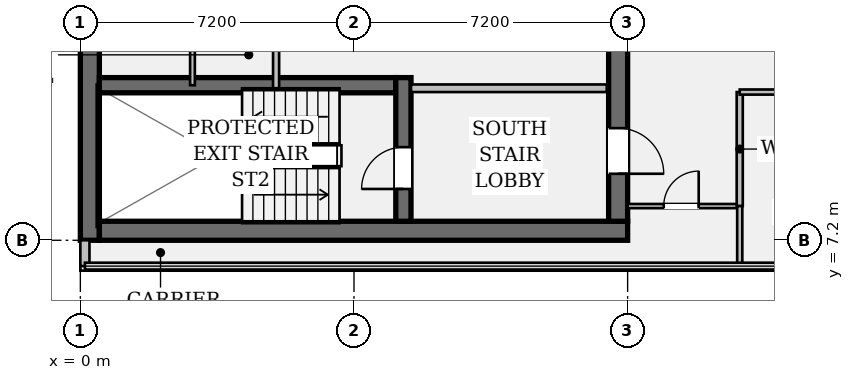
"""IFC4 building model, lengths in metres.
Left out: names, types, materials, properties, quantities, classifications, styles, units other than length and angle.
Written with IfcOpenShell. Run it as: python <this file> out.ifc"""

import sys

from ifc_helpers import new_model, si_unit, direction, frame, frame_2d, origin, place, context, subcontext, project, spatial, rectangle, extrude, element, fill, save


model = new_model("IFC4")
c1 = context("Model", 3, precision=1e-05, world=origin(), true_north=direction((0.0, 1.0)))
c2 = subcontext(c1, "Body", "Model", "MODEL_VIEW")
j1 = project(units=[si_unit("LENGTHUNIT", "METRE"), si_unit("PLANEANGLEUNIT", "RADIAN")], contexts=[c1])
p1 = place(None, origin())
s1 = spatial("IfcSite", under=j1, at=p1, CompositionType="ELEMENT")
p2 = place(p1, origin())
s2 = spatial("IfcBuilding", under=s1, at=p2, CompositionType="ELEMENT")
p3 = place(p2, frame((0.0, 0.0, 272.65)))
s3 = spatial("IfcBuildingStorey", under=s2, at=p3, CompositionType="ELEMENT", Elevation=272.65)
p4 = place(p3, frame((0.25, 7.2, 0.0), z_axis=(0.0, 0.0, 1.0), x_axis=(0.0, 1.0, 0.0)))
e1 = element("IfcWall", 1, at=p4, inside=s3, PredefinedType="SHEAR", context=c2, shape_type="SweptSolid", body=[
    extrude(rectangle(XDim=28.8, YDim=0.5, at=frame_2d((14.4, 0.0))), origin(), (0.0, 0.0, 1.0), 3.24),
])
p5 = place(p3, frame((0.5, 7.45, 0.0), z_axis=(0.0, 0.0, 1.0), x_axis=(1.0, 0.0, 0.0)))
e2 = element("IfcWall", 2, at=p5, inside=s3, PredefinedType="SHEAR", context=c2, shape_type="SweptSolid", body=[
    extrude(rectangle(XDim=13.9, YDim=0.5, at=frame_2d((6.95, 0.0))), origin(), (0.0, 0.0, 1.0), 3.24),
])
p6 = place(p3, frame((14.15, 35.5, 0.0), z_axis=(0.0, 0.0, 1.0), x_axis=(0.0, -1.0, 0.0)))
e3 = element("IfcWall", 3, at=p6, inside=s3, PredefinedType="SHEAR", context=c2, shape_type="SweptSolid", body=[
    extrude(rectangle(XDim=27.8, YDim=0.5, at=frame_2d((13.9, 0.0))), origin(), (0.0, 0.0, 1.0), 3.24),
])
p7 = place(p6, frame((1.4, 0.0, 0.0)))
e4 = element("IfcOpeningElement", 4, at=p7, cuts=e3, PredefinedType="OPENING", context=c2, shape_type="SweptSolid", body=[
    extrude(rectangle(XDim=1.2, YDim=2.15, at=frame_2d((0.6, 1.075))), frame((0.0, 0.262, 0.0), z_axis=(0.0, -1.0, 0.0), x_axis=(1.0, 0.0, 0.0)), (0.0, 0.0, 1.0), 0.524),
])
p8 = place(p6, frame((25.35, 0.0, 0.0)))
e5 = element("IfcOpeningElement", 5, at=p8, cuts=e3, PredefinedType="OPENING", context=c2, shape_type="SweptSolid", body=[
    extrude(rectangle(XDim=1.2, YDim=2.15, at=frame_2d((0.6, 1.075))), frame((0.0, 0.262, 0.0), z_axis=(0.0, -1.0, 0.0), x_axis=(1.0, 0.0, 0.0)), (0.0, 0.0, 1.0), 0.524),
])
p9 = place(p6, frame((14.7, 0.0, 0.0)))
e6 = element("IfcOpeningElement", 6, at=p9, cuts=e3, PredefinedType="OPENING", context=c2, shape_type="SweptSolid", body=[
    extrude(rectangle(XDim=1.6, YDim=2.2, at=frame_2d((0.8, 1.1))), frame((0.0, 0.262, 0.0), z_axis=(0.0, -1.0, 0.0), x_axis=(1.0, 0.0, 0.0)), (0.0, 0.0, 1.0), 0.524),
])
p10 = place(p3, frame((0.5, 11.28, 0.0), z_axis=(0.0, 0.0, 1.0), x_axis=(1.0, 0.0, 0.0)))
e7 = element("IfcWall", 7, at=p10, inside=s3, PredefinedType="SHEAR", context=c2, shape_type="SweptSolid", body=[
    extrude(rectangle(XDim=7.8, YDim=0.4, at=frame_2d((3.9, 0.0))), origin(), (0.0, 0.0, 1.0), 3.24),
])
p11 = place(p3, frame((8.5, 7.7, 0.0), z_axis=(0.0, 0.0, 1.0), x_axis=(0.0, 1.0, 0.0)))
e8 = element("IfcWall", 8, at=p11, inside=s3, PredefinedType="SHEAR", context=c2, shape_type="SweptSolid", body=[
    extrude(rectangle(XDim=3.78, YDim=0.4, at=frame_2d((1.89, 0.0))), origin(), (0.0, 0.0, 1.0), 3.24),
])
p12 = place(p11, frame((0.85, 0.0, 0.0)))
e9 = element("IfcOpeningElement", 9, at=p12, cuts=e8, PredefinedType="OPENING", context=c2, shape_type="SweptSolid", body=[
    extrude(rectangle(XDim=1.1, YDim=2.15, at=frame_2d((0.55, 1.075))), frame((0.0, 0.212, 0.0), z_axis=(0.0, -1.0, 0.0), x_axis=(1.0, 0.0, 0.0)), (0.0, 0.0, 1.0), 0.424),
])
p13 = place(p3, frame((0.12, 6.52, 0.0), z_axis=(0.0, 0.0, 1.0), x_axis=(0.0, 1.0, 0.0)))
e10 = element("IfcWall", 10, at=p13, inside=s3, PredefinedType="STANDARD", context=c2, shape_type="SweptSolid", body=[
    extrude(rectangle(XDim=0.68, YDim=0.24, at=frame_2d((0.34, 0.0))), origin(), (0.0, 0.0, 1.0), 3.24),
])
p14 = place(p3, frame((8.7, 11.2, 0.0), z_axis=(0.0, 0.0, 1.0), x_axis=(1.0, 0.0, 0.0)))
e11 = element("IfcWall", 11, at=p14, inside=s3, PredefinedType="PARTITIONING", context=c2, shape_type="SweptSolid", body=[
    extrude(rectangle(XDim=5.15, YDim=0.2, at=frame_2d((2.575, 0.0))), origin(), (0.0, 0.0, 1.0), 3.24),
])
p15 = place(p3, frame((5.15, 11.2, 0.0), z_axis=(0.0, 0.0, 1.0), x_axis=(0.0, 1.0, 0.0)))
e12 = element("IfcWall", 12, at=p15, inside=s3, PredefinedType="PARTITIONING", context=c2, shape_type="SweptSolid", body=[
    extrude(rectangle(XDim=6.6, YDim=0.16, at=frame_2d((3.3, 0.0))), origin(), (0.0, 0.0, 1.0), 3.24),
])
p16 = place(p3, frame((2.95, 11.28, 0.0), z_axis=(0.0, 0.0, 1.0), x_axis=(0.0, 1.0, 0.0)))
e13 = element("IfcWall", 13, at=p16, inside=s3, PredefinedType="PARTITIONING", context=c2, shape_type="SweptSolid", body=[
    extrude(rectangle(XDim=4.42, YDim=0.125, at=frame_2d((2.21, 0.0))), origin(), (0.0, 0.0, 1.0), 3.24),
])
p17 = place(p16, frame((1.6, 0.0, 0.0)))
e14 = element("IfcOpeningElement", 14, at=p17, cuts=e13, PredefinedType="OPENING", context=c2, shape_type="SweptSolid", body=[
    extrude(rectangle(XDim=0.85, YDim=2.15, at=frame_2d((0.425, 1.075))), frame((0.0, 0.074, 0.0), z_axis=(0.0, -1.0, 0.0), x_axis=(1.0, 0.0, 0.0)), (0.0, 0.0, 1.0), 0.149),
])
p18 = place(p3, frame((14.4, 8.1, 0.0), z_axis=(0.0, 0.0, 1.0), x_axis=(1.0, 0.0, 0.0)))
e15 = element("IfcWall", 15, at=p18, inside=s3, PredefinedType="PARTITIONING", context=c2, shape_type="SweptSolid", body=[
    extrude(rectangle(XDim=2.95, YDim=0.11, at=frame_2d((1.475, 0.0))), origin(), (0.0, 0.0, 1.0), 3.24),
])
p19 = place(p18, frame((0.95, 0.0, 0.0)))
e16 = element("IfcOpeningElement", 16, at=p19, cuts=e15, PredefinedType="OPENING", context=c2, shape_type="SweptSolid", body=[
    extrude(rectangle(XDim=0.92, YDim=2.15, at=frame_2d((0.46, 1.075))), frame((0.0, 0.067, 0.0), z_axis=(0.0, -1.0, 0.0), x_axis=(1.0, 0.0, 0.0)), (0.0, 0.0, 1.0), 0.134),
])
p20 = place(p3, frame((17.35, 8.1, 0.0), z_axis=(0.0, 0.0, 1.0), x_axis=(0.0, 1.0, 0.0)))
e17 = element("IfcWall", 17, at=p20, inside=s3, PredefinedType="PARTITIONING", context=c2, shape_type="SweptSolid", body=[
    extrude(rectangle(XDim=3.0, YDim=0.16, at=frame_2d((1.5, 0.0))), origin(), (0.0, 0.0, 1.0), 3.24),
])
p21 = place(p3, frame((17.35, 11.1, 0.0), z_axis=(0.0, 0.0, 1.0), x_axis=(1.0, 0.0, 0.0)))
e18 = element("IfcWall", 18, at=p21, inside=s3, PredefinedType="PARTITIONING", context=c2, shape_type="SweptSolid", body=[
    extrude(rectangle(XDim=11.4, YDim=0.135, at=frame_2d((5.7, 0.0))), origin(), (0.0, 0.0, 1.0), 2.676),
])
p22 = place(p21, frame((3.73, 0.0, 0.0)))
e19 = element("IfcOpeningElement", 19, at=p22, cuts=e18, PredefinedType="OPENING", context=c2, shape_type="SweptSolid", body=[
    extrude(rectangle(XDim=0.92, YDim=2.15, at=frame_2d((0.46, 1.075))), frame((0.0, 0.08, 0.0), z_axis=(0.0, -1.0, 0.0), x_axis=(1.0, 0.0, 0.0)), (0.0, 0.0, 1.0), 0.159),
])
p23 = place(p21, frame((9.42, 0.0, 0.0)))
e20 = element("IfcOpeningElement", 20, at=p23, cuts=e18, PredefinedType="OPENING", context=c2, shape_type="SweptSolid", body=[
    extrude(rectangle(XDim=0.92, YDim=2.15, at=frame_2d((0.46, 1.075))), frame((0.0, 0.08, 0.0), z_axis=(0.0, -1.0, 0.0), x_axis=(1.0, 0.0, 0.0)), (0.0, 0.0, 1.0), 0.159),
])
p24 = place(p3, frame((17.35, 6.52, 0.0), z_axis=(0.0, 0.0, 1.0), x_axis=(0.0, 1.0, 0.0)))
e21 = element("IfcWall", 21, at=p24, inside=s3, PredefinedType="PARTITIONING", context=c2, shape_type="SweptSolid", body=[
    extrude(rectangle(XDim=1.58, YDim=0.135, at=frame_2d((0.79, 0.0))), origin(), (0.0, 0.0, 1.0), 3.24),
])
p25 = place(p12, origin())
e22 = element("IfcDoor", 22, at=p25, inside=s3, OperationType="SINGLE_SWING_LEFT", PredefinedType="DOOR", context=c2, shape_type="SweptSolid", body=[
    extrude(rectangle(XDim=1.1, YDim=2.15, at=frame_2d((0.55, 1.075))), frame((0.0, 0.025, 0.0), z_axis=(0.0, -1.0, 0.0), x_axis=(1.0, 0.0, 0.0)), (0.0, 0.0, 1.0), 0.05),
])
fill(e9, e22)
p26 = place(p8, origin())
e23 = element("IfcDoor", 23, at=p26, inside=s3, OperationType="SINGLE_SWING_RIGHT", PredefinedType="DOOR", context=c2, shape_type="SweptSolid", body=[
    extrude(rectangle(XDim=1.2, YDim=2.15, at=frame_2d((0.6, 1.075))), frame((0.0, 0.025, 0.0), z_axis=(0.0, -1.0, 0.0), x_axis=(1.0, 0.0, 0.0)), (0.0, 0.0, 1.0), 0.05),
])
fill(e5, e23)
p27 = place(p19, origin())
e24 = element("IfcDoor", 24, at=p27, inside=s3, OperationType="SINGLE_SWING_RIGHT", PredefinedType="DOOR", context=c2, shape_type="SweptSolid", body=[
    extrude(rectangle(XDim=0.92, YDim=2.15, at=frame_2d((0.46, 1.075))), frame((0.0, 0.025, 0.0), z_axis=(0.0, -1.0, 0.0), x_axis=(1.0, 0.0, 0.0)), (0.0, 0.0, 1.0), 0.05),
])
fill(e16, e24)
save(model, sys.argv[1])
